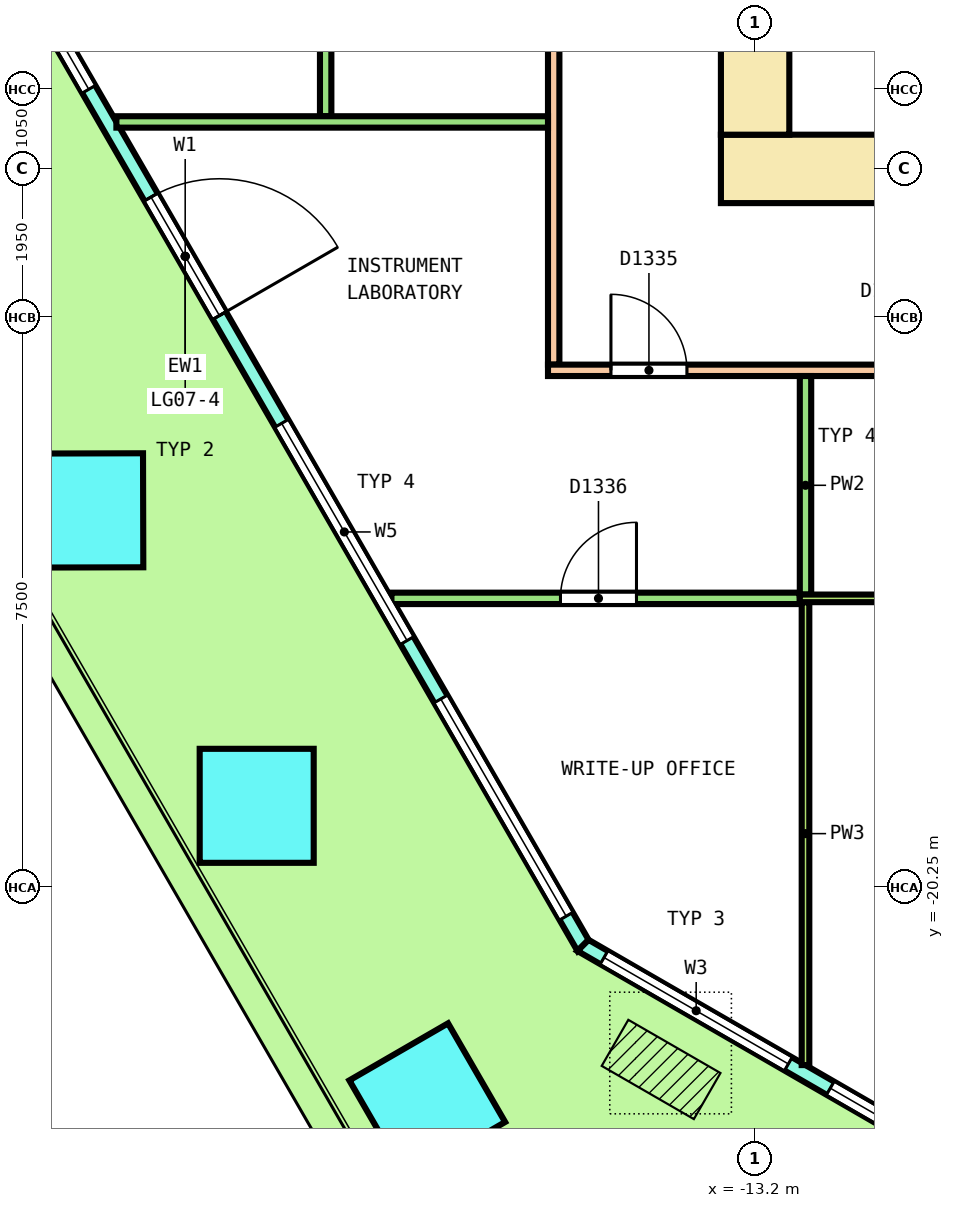
"""IFC4 building model, lengths in metres.
Left out: names, types, materials, properties, quantities, classifications, styles, units other than length and angle.
Written with IfcOpenShell. Run it as: python <this file> out.ifc"""

import sys

from ifc_helpers import new_model, si_unit, direction, frame, frame_2d, origin, origin_2d, place, context, subcontext, project, spatial, polyline, rectangle, outline, extrude, element, fill, save


model = new_model("IFC4")
c1 = context("Model", 3, precision=1e-05, world=origin(), true_north=direction((0.0, 1.0)))
c2 = subcontext(c1, "Body", "Model", "MODEL_VIEW")
j1 = project(units=[si_unit("LENGTHUNIT", "METRE"), si_unit("PLANEANGLEUNIT", "RADIAN")], contexts=[c1])
p1 = place(None, origin())
s1 = spatial("IfcSite", under=j1, at=p1, CompositionType="ELEMENT")
p2 = place(p1, origin())
s2 = spatial("IfcBuilding", under=s1, at=p2, CompositionType="ELEMENT")
p3 = place(p2, frame((0.0, 0.0, 32.2)))
s3 = spatial("IfcBuildingStorey", under=s2, at=p3, CompositionType="ELEMENT", Elevation=32.2)
p4 = place(p3, frame((-22.001, -15.293, 0.0), z_axis=(0.003616759812, -0.006269050341, 0.999973808685), x_axis=(0.501883236828, -0.864905101718, -0.007237514304)))
e1 = element("IfcColumn", 1, at=p4, inside=s3, PredefinedType="COLUMN", context=c2, shape_type="SweptSolid", body=[
    extrude(rectangle(XDim=1.5, YDim=1.5, at=origin_2d()), origin(), (0.0, 0.0, 1.0), 4.05),
])
p5 = place(p3, frame((-19.757, -19.179, 0.0), z_axis=(0.010908253887, -0.018863444567, 0.99976256204), x_axis=(0.500638377412, -0.865382225109, -0.021790354016)))
e2 = element("IfcColumn", 2, at=p5, inside=s3, PredefinedType="COLUMN", context=c2, shape_type="SweptSolid", body=[
    extrude(rectangle(XDim=1.5, YDim=1.5, at=origin_2d()), origin(), (0.0, 0.0, 1.0), 4.051),
])
p6 = place(p3, frame((-17.514, -23.065, 0.0), z_axis=(0.018132595726, -0.031445896907, 0.999340965106), x_axis=(0.865740985748, -0.499504693256, -0.031426215359)))
e3 = element("IfcColumn", 3, at=p6, inside=s3, PredefinedType="COLUMN", context=c2, shape_type="SweptSolid", body=[
    extrude(rectangle(XDim=1.5, YDim=1.5, at=origin_2d()), origin(), (0.0, 0.0, 1.0), 4.053),
])
p7 = place(p3, frame((-25.932, -2.884, 0.0), z_axis=(0.0, 0.0, 1.0), x_axis=(0.499999366442, -0.866025769569, 0.0)))
e4 = element("IfcWall", 4, at=p7, inside=s3, PredefinedType="SOLIDWALL", context=c2, shape_type="SweptSolid", body=[
    extrude(outline(polyline([(-0.027, -0.1), (1.023, -0.1), (2.072, -0.1), (3.122, -0.1), (4.171, -0.1), (5.221, -0.1), (6.27, -0.1), (7.32, -0.1), (8.369, -0.1), (9.419, -0.1), (10.468, -0.1), (11.518, -0.1), (12.567, -0.1), (13.617, -0.1), (14.666, -0.1), (15.716, -0.1), (16.765, -0.1), (17.815, -0.1), (18.864, -0.1), (19.914, -0.1), (20.963, -0.1), (20.91, 0.1), (19.865, 0.1), (18.821, 0.1), (17.777, 0.1), (16.733, 0.1), (15.689, 0.1), (14.645, 0.1), (13.601, 0.1), (12.557, 0.1), (11.512, 0.1), (10.468, 0.1), (9.424, 0.1), (8.38, 0.1), (7.336, 0.1), (6.292, 0.1), (5.248, 0.1), (4.203, 0.1), (3.159, 0.1), (2.115, 0.1), (1.071, 0.1), (0.027, 0.1), (-0.027, -0.1)])), origin(), (0.0, 0.0, 1.0), 4.1),
])
p8 = place(p7, frame((0.444, 0.0, 0.1)))
e5 = element("IfcOpeningElement", 5, at=p8, cuts=e4, PredefinedType="OPENING", context=c2, shape_type="SweptSolid", body=[
    extrude(rectangle(XDim=3.3, YDim=2.9, at=frame_2d((1.65, 1.45))), frame((0.0, 0.11, 0.0), z_axis=(0.0, -1.0, 0.0), x_axis=(1.0, 0.0, 0.0)), (0.0, 0.0, 1.0), 0.22),
])
p9 = place(p7, frame((4.631, 0.0, 0.1)))
e6 = element("IfcOpeningElement", 6, at=p9, cuts=e4, PredefinedType="OPENING", context=c2, shape_type="SweptSolid", body=[
    extrude(rectangle(XDim=3.3, YDim=2.9, at=frame_2d((1.65, 1.45))), frame((0.0, 0.11, 0.0), z_axis=(0.0, -1.0, 0.0), x_axis=(1.0, 0.0, 0.0)), (0.0, 0.0, 1.0), 0.22),
])
p10 = place(p7, frame((9.568, 0.0, 0.0)))
e7 = element("IfcOpeningElement", 7, at=p10, cuts=e4, PredefinedType="OPENING", context=c2, shape_type="SweptSolid", body=[
    extrude(rectangle(XDim=1.8, YDim=2.4, at=frame_2d((0.9, 1.2))), frame((0.0, 0.11, 0.0), z_axis=(0.0, -1.0, 0.0), x_axis=(1.0, 0.0, 0.0)), (0.0, 0.0, 1.0), 0.22),
])
p11 = place(p7, frame((9.568, 0.0, 2.55)))
e8 = element("IfcOpeningElement", 8, at=p11, cuts=e4, PredefinedType="OPENING", context=c2, shape_type="SweptSolid", body=[
    extrude(rectangle(XDim=1.8, YDim=0.45, at=frame_2d((0.9, 0.225))), frame((0.0, 0.11, 0.0), z_axis=(0.0, -1.0, 0.0), x_axis=(1.0, 0.0, 0.0)), (0.0, 0.0, 1.0), 0.22),
])
p12 = place(p7, frame((13.006, 0.0, 0.1)))
e9 = element("IfcOpeningElement", 9, at=p12, cuts=e4, PredefinedType="OPENING", context=c2, shape_type="SweptSolid", body=[
    extrude(rectangle(XDim=3.3, YDim=2.9, at=frame_2d((1.65, 1.45))), frame((0.0, 0.11, 0.0), z_axis=(0.0, -1.0, 0.0), x_axis=(1.0, 0.0, 0.0)), (0.0, 0.0, 1.0), 0.22),
])
p13 = place(p7, frame((17.193, 0.0, 0.1)))
e10 = element("IfcOpeningElement", 10, at=p13, cuts=e4, PredefinedType="OPENING", context=c2, shape_type="SweptSolid", body=[
    extrude(rectangle(XDim=3.3, YDim=2.9, at=frame_2d((1.65, 1.45))), frame((0.0, 0.11, 0.0), z_axis=(0.0, -1.0, 0.0), x_axis=(1.0, 0.0, 0.0)), (0.0, 0.0, 1.0), 0.22),
])
p14 = place(p3, frame((-15.464, -21.016, 0.0), z_axis=(0.0, 0.0, 1.0), x_axis=(0.866029458321, -0.49999297727, 0.0)))
e11 = element("IfcWall", 11, at=p14, inside=s3, PredefinedType="SOLIDWALL", context=c2, shape_type="SweptSolid", body=[
    extrude(outline(polyline([(-0.027, -0.1), (1.128, -0.1), (2.282, -0.1), (3.437, -0.1), (4.592, -0.1), (5.747, -0.1), (6.901, -0.1), (6.848, 0.1), (5.711, 0.1), (4.574, 0.1), (3.437, 0.1), (2.301, 0.1), (1.164, 0.1), (0.027, 0.1), (-0.027, -0.1)])), origin(), (0.0, 0.0, 1.0), 4.1),
])
p15 = place(p14, frame((0.319, 0.0, 0.1)))
e12 = element("IfcOpeningElement", 12, at=p15, cuts=e11, PredefinedType="OPENING", context=c2, shape_type="SweptSolid", body=[
    extrude(rectangle(XDim=2.8, YDim=2.9, at=frame_2d((1.4, 1.45))), frame((0.0, 0.11, 0.0), z_axis=(0.0, -1.0, 0.0), x_axis=(1.0, 0.0, 0.0)), (0.0, 0.0, 1.0), 0.22),
])
p16 = place(p14, frame((3.756, 0.0, 0.1)))
e13 = element("IfcOpeningElement", 13, at=p16, cuts=e11, PredefinedType="OPENING", context=c2, shape_type="SweptSolid", body=[
    extrude(rectangle(XDim=2.8, YDim=2.9, at=frame_2d((1.4, 1.45))), frame((0.0, 0.11, 0.0), z_axis=(0.0, -1.0, 0.0), x_axis=(1.0, 0.0, 0.0)), (0.0, 0.0, 1.0), 0.22),
])
p17 = place(p3, frame((-13.65, -10.8, 0.0), z_axis=(0.0, 0.0, 1.0), x_axis=(1.0, 0.0, 0.0)))
e14 = element("IfcWall", 14, at=p17, inside=s3, PredefinedType="SHEAR", context=c2, shape_type="SweptSolid", body=[
    extrude(rectangle(XDim=27.3, YDim=0.9, at=frame_2d((13.65, 0.0))), origin(), (0.0, 0.0, 1.0), 4.1),
])
p18 = place(p17, frame((3.453, 0.0, 0.0)))
e15 = element("IfcOpeningElement", 15, at=p18, cuts=e14, PredefinedType="OPENING", context=c2, shape_type="SweptSolid", body=[
    extrude(rectangle(XDim=1.0, YDim=2.1, at=frame_2d((0.5, 1.05))), frame((0.0, 0.46, 0.0), z_axis=(0.0, -1.0, 0.0), x_axis=(1.0, 0.0, 0.0)), (0.0, 0.0, 1.0), 0.92),
])
p19 = place(p17, frame((9.653, 0.0, 0.0)))
e16 = element("IfcOpeningElement", 16, at=p19, cuts=e14, PredefinedType="OPENING", context=c2, shape_type="SweptSolid", body=[
    extrude(rectangle(XDim=1.0, YDim=2.1, at=frame_2d((0.5, 1.05))), frame((0.0, 0.46, 0.0), z_axis=(0.0, -1.0, 0.0), x_axis=(1.0, 0.0, 0.0)), (0.0, 0.0, 1.0), 0.92),
])
p20 = place(p17, frame((19.872, 0.0, 0.0)))
e17 = element("IfcOpeningElement", 17, at=p20, cuts=e14, PredefinedType="OPENING", context=c2, shape_type="SweptSolid", body=[
    extrude(rectangle(XDim=1.0, YDim=2.1, at=frame_2d((0.5, 1.05))), frame((0.0, 0.46, 0.0), z_axis=(0.0, -1.0, 0.0), x_axis=(1.0, 0.0, 0.0)), (0.0, 0.0, 1.0), 0.92),
])
p21 = place(p17, frame((23.922, 0.0, 0.0)))
e18 = element("IfcOpeningElement", 18, at=p21, cuts=e14, PredefinedType="OPENING", context=c2, shape_type="SweptSolid", body=[
    extrude(rectangle(XDim=1.0, YDim=2.1, at=frame_2d((0.5, 1.05))), frame((0.0, 0.46, 0.0), z_axis=(0.0, -1.0, 0.0), x_axis=(1.0, 0.0, 0.0)), (0.0, 0.0, 1.0), 0.92),
])
p22 = place(p17, frame((15.2, 0.0, 0.0)))
e19 = element("IfcOpeningElement", 19, at=p22, cuts=e14, PredefinedType="OPENING", context=c2, shape_type="SweptSolid", body=[
    extrude(rectangle(XDim=1.2, YDim=2.1, at=frame_2d((0.6, 1.05))), frame((0.0, 0.46, 0.0), z_axis=(0.0, -1.0, 0.0), x_axis=(1.0, 0.0, 0.0)), (0.0, 0.0, 1.0), 0.92),
])
p23 = place(p3, frame((-13.2, -10.35, 0.0), z_axis=(0.0, 0.0, 1.0), x_axis=(0.0, 1.0, 0.0)))
e20 = element("IfcWall", 20, at=p23, inside=s3, PredefinedType="SHEAR", context=c2, shape_type="SweptSolid", body=[
    extrude(rectangle(XDim=20.7, YDim=0.9, at=frame_2d((10.35, 0.0))), origin(), (0.0, 0.0, 1.0), 4.1),
])
p24 = place(p23, frame((9.15, 0.0, 0.0)))
e21 = element("IfcOpeningElement", 21, at=p24, cuts=e20, PredefinedType="OPENING", context=c2, shape_type="SweptSolid", body=[
    extrude(rectangle(XDim=2.4, YDim=2.1, at=frame_2d((1.2, 1.05))), frame((0.0, 0.46, 0.0), z_axis=(0.0, -1.0, 0.0), x_axis=(1.0, 0.0, 0.0)), (0.0, 0.0, 1.0), 0.92),
])
p25 = place(p23, frame((16.05, 0.0, 0.0)))
e22 = element("IfcOpeningElement", 22, at=p25, cuts=e20, PredefinedType="OPENING", context=c2, shape_type="SweptSolid", body=[
    extrude(rectangle(XDim=1.2, YDim=2.1, at=frame_2d((0.6, 1.05))), frame((0.0, 0.46, 0.0), z_axis=(0.0, -1.0, 0.0), x_axis=(1.0, 0.0, 0.0)), (0.0, 0.0, 1.0), 0.92),
])
p26 = place(p23, frame((3.45, 0.0, 0.0)))
e23 = element("IfcOpeningElement", 23, at=p26, cuts=e20, PredefinedType="OPENING", context=c2, shape_type="SweptSolid", body=[
    extrude(rectangle(XDim=1.2, YDim=2.1, at=frame_2d((0.6, 1.05))), frame((0.0, 0.46, 0.0), z_axis=(0.0, -1.0, 0.0), x_axis=(1.0, 0.0, 0.0)), (0.0, 0.0, 1.0), 0.92),
])
p27 = place(p3, frame((-15.85, -13.375, 0.0), z_axis=(0.0, 0.0, 1.0), x_axis=(0.0, 1.0, 0.0)))
e24 = element("IfcWall", 24, at=p27, inside=s3, PredefinedType="PARTITIONING", context=c2, shape_type="SweptSolid", body=[
    extrude(rectangle(XDim=26.75, YDim=0.15, at=frame_2d((13.375, 0.0))), origin(), (0.0, 0.0, 1.0), 3.05),
])
p28 = place(p27, frame((24.631, 0.0, 0.0)))
e25 = element("IfcOpeningElement", 25, at=p28, cuts=e24, PredefinedType="OPENING", context=c2, shape_type="SweptSolid", body=[
    extrude(rectangle(XDim=1.0, YDim=2.1, at=frame_2d((0.5, 1.05))), frame((0.0, 0.085, 0.0), z_axis=(0.0, -1.0, 0.0), x_axis=(1.0, 0.0, 0.0)), (0.0, 0.0, 1.0), 0.17),
])
p29 = place(p27, frame((16.371, 0.0, 0.0)))
e26 = element("IfcOpeningElement", 26, at=p29, cuts=e24, PredefinedType="OPENING", context=c2, shape_type="SweptSolid", body=[
    extrude(rectangle(XDim=1.0, YDim=2.1, at=frame_2d((0.5, 1.05))), frame((0.0, 0.085, 0.0), z_axis=(0.0, -1.0, 0.0), x_axis=(1.0, 0.0, 0.0)), (0.0, 0.0, 1.0), 0.17),
])
p30 = place(p27, frame((6.705, 0.0, 0.0)))
e27 = element("IfcOpeningElement", 27, at=p30, cuts=e24, PredefinedType="OPENING", context=c2, shape_type="SweptSolid", body=[
    extrude(rectangle(XDim=1.0, YDim=2.1, at=frame_2d((0.5, 1.05))), frame((0.0, 0.085, 0.0), z_axis=(0.0, -1.0, 0.0), x_axis=(1.0, 0.0, 0.0)), (0.0, 0.0, 1.0), 0.17),
])
p31 = place(p3, frame((-15.925, -13.45, 0.0), z_axis=(0.0, 0.0, 1.0), x_axis=(1.0, 0.0, 0.0)))
e28 = element("IfcWall", 28, at=p31, inside=s3, PredefinedType="PARTITIONING", context=c2, shape_type="SweptSolid", body=[
    extrude(rectangle(XDim=31.85, YDim=0.15, at=frame_2d((15.925, 0.0))), origin(), (0.0, 0.0, 1.0), 3.05),
])
p32 = place(p31, frame((0.828, 0.0, 0.0)))
e29 = element("IfcOpeningElement", 29, at=p32, cuts=e28, PredefinedType="OPENING", context=c2, shape_type="SweptSolid", body=[
    extrude(rectangle(XDim=1.0, YDim=2.1, at=frame_2d((0.5, 1.05))), frame((0.0, 0.085, 0.0), z_axis=(0.0, -1.0, 0.0), x_axis=(1.0, 0.0, 0.0)), (0.0, 0.0, 1.0), 0.17),
])
p33 = place(p31, frame((5.017, 0.0, 0.0)))
e30 = element("IfcOpeningElement", 30, at=p33, cuts=e28, PredefinedType="OPENING", context=c2, shape_type="SweptSolid", body=[
    extrude(rectangle(XDim=1.0, YDim=2.1, at=frame_2d((0.5, 1.05))), frame((0.0, 0.085, 0.0), z_axis=(0.0, -1.0, 0.0), x_axis=(1.0, 0.0, 0.0)), (0.0, 0.0, 1.0), 0.17),
])
p34 = place(p31, frame((17.861, 0.0, 0.0)))
e31 = element("IfcOpeningElement", 31, at=p34, cuts=e28, PredefinedType="OPENING", context=c2, shape_type="SweptSolid", body=[
    extrude(rectangle(XDim=1.0, YDim=2.1, at=frame_2d((0.5, 1.05))), frame((0.0, 0.085, 0.0), z_axis=(0.0, -1.0, 0.0), x_axis=(1.0, 0.0, 0.0)), (0.0, 0.0, 1.0), 0.17),
])
p35 = place(p31, frame((24.837, 0.0, 0.0)))
e32 = element("IfcOpeningElement", 32, at=p35, cuts=e28, PredefinedType="OPENING", context=c2, shape_type="SweptSolid", body=[
    extrude(rectangle(XDim=1.0, YDim=2.1, at=frame_2d((0.5, 1.05))), frame((0.0, 0.085, 0.0), z_axis=(0.0, -1.0, 0.0), x_axis=(1.0, 0.0, 0.0)), (0.0, 0.0, 1.0), 0.17),
])
p36 = place(p3, frame((-18.85, -10.107, 0.0), z_axis=(0.0, 0.0, 1.0), x_axis=(0.0, 1.0, 0.0)))
e33 = element("IfcWall", 33, at=p36, inside=s3, PredefinedType="PARTITIONING", context=c2, shape_type="SweptSolid", body=[
    extrude(rectangle(XDim=20.657, YDim=0.15, at=frame_2d((10.329, 0.0))), origin(), (0.0, 0.0, 1.0), 3.05),
])
p37 = place(p36, frame((17.139, 0.0, 0.0)))
e34 = element("IfcOpeningElement", 34, at=p37, cuts=e33, PredefinedType="OPENING", context=c2, shape_type="SweptSolid", body=[
    extrude(rectangle(XDim=1.2, YDim=2.1, at=frame_2d((0.6, 1.05))), frame((0.0, 0.085, 0.0), z_axis=(0.0, -1.0, 0.0), x_axis=(1.0, 0.0, 0.0)), (0.0, 0.0, 1.0), 0.17),
])
p38 = place(p3, frame((-21.603, -10.182, 0.0), z_axis=(0.0, 0.0, 1.0), x_axis=(1.0, 0.0, 0.0)))
e35 = element("IfcWall", 35, at=p38, inside=s3, PredefinedType="PARTITIONING", context=c2, shape_type="SweptSolid", body=[
    extrude(rectangle(XDim=5.678, YDim=0.15, at=frame_2d((2.839, 0.0))), origin(), (0.0, 0.0, 1.0), 3.05),
])
p39 = place(p3, frame((-17.985, -16.45, 0.0), z_axis=(0.0, 0.0, 1.0), x_axis=(1.0, 0.0, 0.0)))
e36 = element("IfcWall", 36, at=p39, inside=s3, PredefinedType="PARTITIONING", context=c2, shape_type="SweptSolid", body=[
    extrude(rectangle(XDim=5.373, YDim=0.15, at=frame_2d((2.686, 0.0))), origin(), (0.0, 0.0, 1.0), 3.05),
])
p40 = place(p39, frame((2.224, 0.0, 0.0)))
e37 = element("IfcOpeningElement", 37, at=p40, cuts=e36, PredefinedType="OPENING", context=c2, shape_type="SweptSolid", body=[
    extrude(rectangle(XDim=1.0, YDim=2.1, at=frame_2d((0.5, 1.05))), frame((0.0, 0.085, 0.0), z_axis=(0.0, -1.0, 0.0), x_axis=(1.0, 0.0, 0.0)), (0.0, 0.0, 1.0), 0.17),
])
p41 = place(p3, frame((-12.537, -16.4, 0.0), z_axis=(0.0, 0.0, 1.0), x_axis=(0.0, 1.0, 0.0)))
e38 = element("IfcWall", 38, at=p41, inside=s3, PredefinedType="PARTITIONING", context=c2, shape_type="SweptSolid", body=[
    extrude(rectangle(XDim=2.875, YDim=0.15, at=frame_2d((1.438, 0.0))), origin(), (0.0, 0.0, 1.0), 3.05),
])
p42 = place(p3, frame((-12.537, -22.59, 0.0), z_axis=(0.0, 0.0, 1.0), x_axis=(0.0, 1.0, 0.0)))
e39 = element("IfcWall", 39, at=p42, inside=s3, PredefinedType="PARTITIONING", context=c2, shape_type="SweptSolid", body=[
    extrude(rectangle(XDim=6.09, YDim=0.1, at=frame_2d((3.045, 0.0))), origin(), (0.0, 0.0, 1.0), 3.05),
])
p43 = place(p3, frame((-12.612, -16.45, 0.0), z_axis=(0.0, 0.0, 1.0), x_axis=(1.0, 0.0, 0.0)))
e40 = element("IfcWall", 40, at=p43, inside=s3, PredefinedType="PARTITIONING", context=c2, shape_type="SweptSolid", body=[
    extrude(rectangle(XDim=6.815, YDim=0.1, at=frame_2d((3.407, 0.0))), origin(), (0.0, 0.0, 1.0), 3.05),
])
p44 = place(p43, frame((4.111, 0.0, 0.0)))
e41 = element("IfcOpeningElement", 41, at=p44, cuts=e40, PredefinedType="OPENING", context=c2, shape_type="SweptSolid", body=[
    extrude(rectangle(XDim=1.2, YDim=2.1, at=frame_2d((0.6, 1.05))), frame((0.0, 0.06, 0.0), z_axis=(0.0, -1.0, 0.0), x_axis=(1.0, 0.0, 0.0)), (0.0, 0.0, 1.0), 0.12),
])
p45 = place(p9, origin())
e42 = element("IfcWindow", 42, at=p45, inside=s3, PartitioningType="SINGLE_PANEL", PredefinedType="WINDOW", context=c2, shape_type="SweptSolid", body=[
    extrude(rectangle(XDim=3.3, YDim=2.9, at=frame_2d((1.65, 1.45))), frame((0.0, 0.03, 0.0), z_axis=(0.0, -1.0, 0.0), x_axis=(1.0, 0.0, 0.0)), (0.0, 0.0, 1.0), 0.06),
])
fill(e6, e42)
p46 = place(p10, origin())
e43 = element("IfcDoor", 43, at=p46, inside=s3, OperationType="DOUBLE_DOOR_SINGLE_SWING", PredefinedType="DOOR", context=c2, shape_type="SweptSolid", body=[
    extrude(rectangle(XDim=1.8, YDim=2.4, at=frame_2d((0.9, 1.2))), frame((0.0, 0.025, 0.0), z_axis=(0.0, -1.0, 0.0), x_axis=(1.0, 0.0, 0.0)), (0.0, 0.0, 1.0), 0.05),
])
fill(e7, e43)
p47 = place(p11, origin())
e44 = element("IfcWindow", 44, at=p47, inside=s3, PartitioningType="SINGLE_PANEL", PredefinedType="WINDOW", context=c2, shape_type="SweptSolid", body=[
    extrude(rectangle(XDim=1.8, YDim=0.45, at=frame_2d((0.9, 0.225))), frame((0.0, 0.03, 0.0), z_axis=(0.0, -1.0, 0.0), x_axis=(1.0, 0.0, 0.0)), (0.0, 0.0, 1.0), 0.06),
])
fill(e8, e44)
p48 = place(p12, origin())
e45 = element("IfcWindow", 45, at=p48, inside=s3, PartitioningType="SINGLE_PANEL", PredefinedType="WINDOW", context=c2, shape_type="SweptSolid", body=[
    extrude(rectangle(XDim=3.3, YDim=2.9, at=frame_2d((1.65, 1.45))), frame((0.0, 0.03, 0.0), z_axis=(0.0, -1.0, 0.0), x_axis=(1.0, 0.0, 0.0)), (0.0, 0.0, 1.0), 0.06),
])
fill(e9, e45)
p49 = place(p13, origin())
e46 = element("IfcWindow", 46, at=p49, inside=s3, PartitioningType="SINGLE_PANEL", PredefinedType="WINDOW", context=c2, shape_type="SweptSolid", body=[
    extrude(rectangle(XDim=3.3, YDim=2.9, at=frame_2d((1.65, 1.45))), frame((0.0, 0.03, 0.0), z_axis=(0.0, -1.0, 0.0), x_axis=(1.0, 0.0, 0.0)), (0.0, 0.0, 1.0), 0.06),
])
fill(e10, e46)
p50 = place(p15, origin())
e47 = element("IfcWindow", 47, at=p50, inside=s3, PartitioningType="SINGLE_PANEL", PredefinedType="WINDOW", context=c2, shape_type="SweptSolid", body=[
    extrude(rectangle(XDim=2.8, YDim=2.9, at=frame_2d((1.4, 1.45))), frame((0.0, 0.03, 0.0), z_axis=(0.0, -1.0, 0.0), x_axis=(1.0, 0.0, 0.0)), (0.0, 0.0, 1.0), 0.06),
])
fill(e12, e47)
p51 = place(p16, origin())
e48 = element("IfcWindow", 48, at=p51, inside=s3, PartitioningType="SINGLE_PANEL", PredefinedType="WINDOW", context=c2, shape_type="SweptSolid", body=[
    extrude(rectangle(XDim=2.8, YDim=2.9, at=frame_2d((1.4, 1.45))), frame((0.0, 0.03, 0.0), z_axis=(0.0, -1.0, 0.0), x_axis=(1.0, 0.0, 0.0)), (0.0, 0.0, 1.0), 0.06),
])
fill(e13, e48)
p52 = place(p32, origin())
e49 = element("IfcDoor", 49, at=p52, inside=s3, OperationType="SINGLE_SWING_RIGHT", PredefinedType="DOOR", context=c2, shape_type="SweptSolid", body=[
    extrude(rectangle(XDim=1.0, YDim=2.1, at=frame_2d((0.5, 1.05))), frame((0.0, 0.025, 0.0), z_axis=(0.0, -1.0, 0.0), x_axis=(1.0, 0.0, 0.0)), (0.0, 0.0, 1.0), 0.05),
])
fill(e29, e49)
p53 = place(p40, origin())
e50 = element("IfcDoor", 50, at=p53, inside=s3, OperationType="SINGLE_SWING_LEFT", PredefinedType="DOOR", context=c2, shape_type="SweptSolid", body=[
    extrude(rectangle(XDim=1.0, YDim=2.1, at=frame_2d((0.5, 1.05))), frame((0.0, 0.025, 0.0), z_axis=(0.0, -1.0, 0.0), x_axis=(1.0, 0.0, 0.0)), (0.0, 0.0, 1.0), 0.05),
])
fill(e37, e50)
save(model, sys.argv[1])
